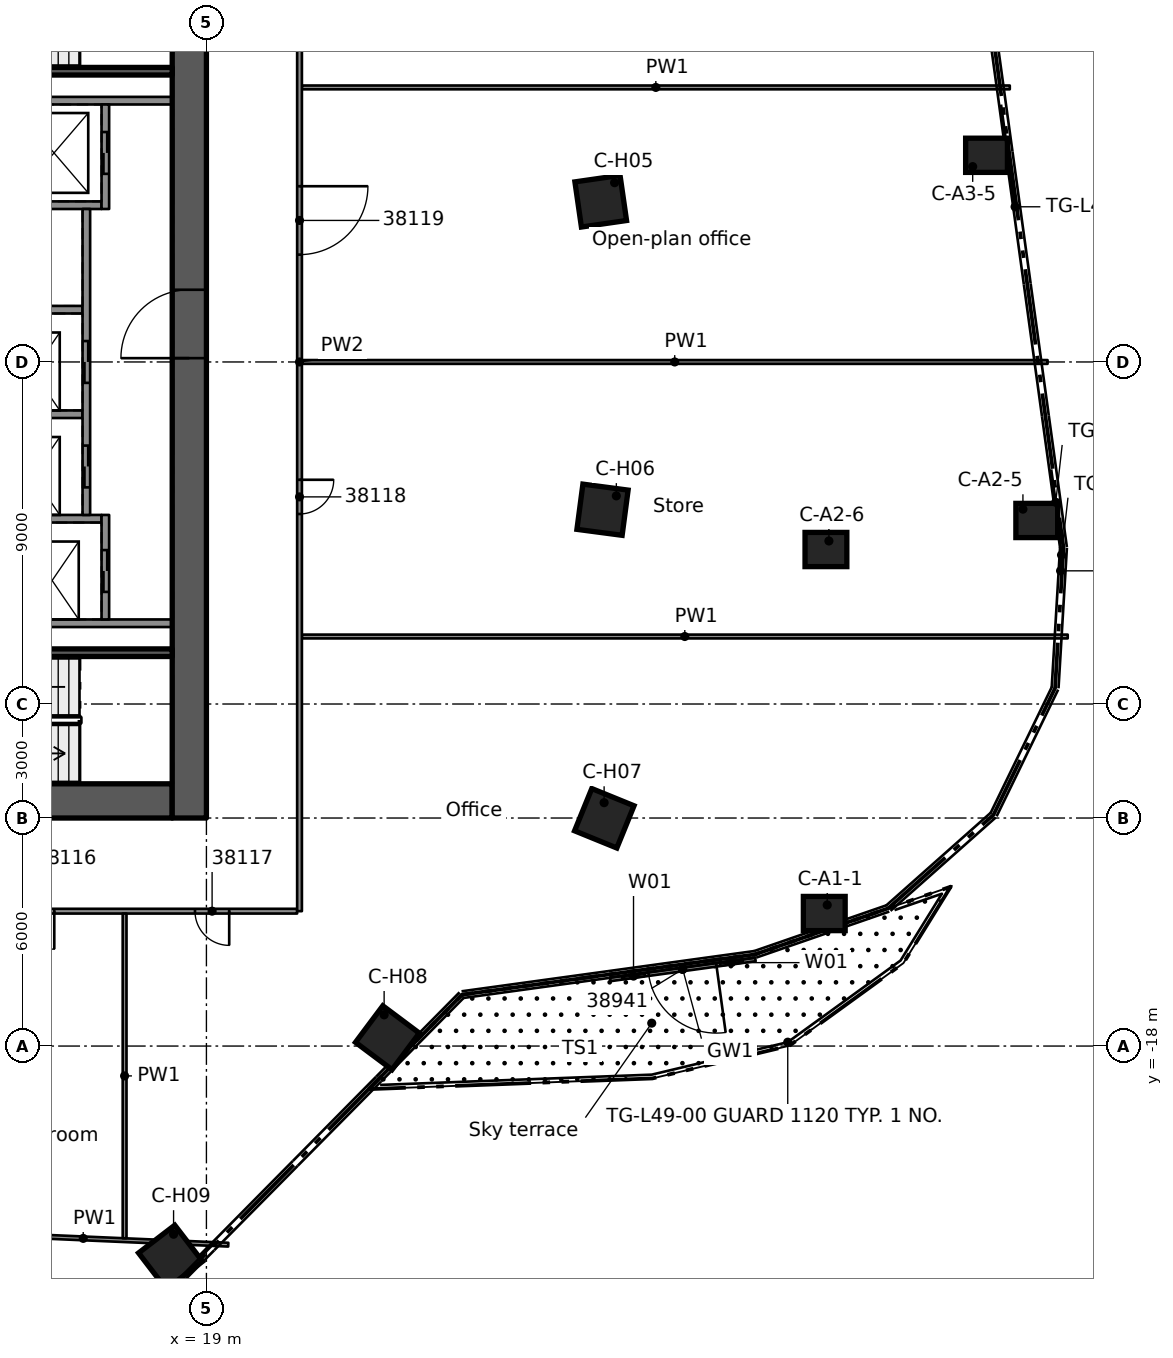
"""IFC4 building model, lengths in metres.
Left out: names, types, materials, properties, quantities, classifications, styles, units other than length and angle.
Written with IfcOpenShell. Run it as: python <this file> out.ifc"""

import sys

from ifc_helpers import new_model, si_unit, direction, frame, frame_2d, origin, origin_2d, place, context, subcontext, project, spatial, rectangle, extrude, element, fill, save


model = new_model("IFC4")
c1 = context("Model", 3, precision=1e-05, world=origin(), true_north=direction((0.0, 1.0)))
c2 = subcontext(c1, "Body", "Model", "MODEL_VIEW")
j1 = project(units=[si_unit("LENGTHUNIT", "METRE"), si_unit("PLANEANGLEUNIT", "RADIAN")], contexts=[c1])
p1 = place(None, origin())
s1 = spatial("IfcSite", under=j1, at=p1, CompositionType="ELEMENT")
p2 = place(p1, origin())
s2 = spatial("IfcBuilding", under=s1, at=p2, CompositionType="ELEMENT")
p3 = place(p2, frame((0.0, 0.0, 188.6)))
s3 = spatial("IfcBuildingStorey", under=s2, at=p3, CompositionType="ELEMENT", Elevation=188.6)
p4 = place(p3, frame((8.9, -11.55, 0.0), z_axis=(0.0, 0.0, 1.0), x_axis=(1.0, 0.0, 0.0)))
e1 = element("IfcWall", 1, at=p4, inside=s3, PredefinedType="SHEAR", context=c2, shape_type="SweptSolid", body=[
    extrude(rectangle(XDim=9.2, YDim=0.9, at=frame_2d((4.6, 0.0))), origin(), (0.0, 0.0, 1.0), 3.5),
])
p5 = place(p4, frame((3.0, 0.0, 0.0)))
e2 = element("IfcOpeningElement", 2, at=p5, cuts=e1, PredefinedType="OPENING", context=c2, shape_type="SweptSolid", body=[
    extrude(rectangle(XDim=1.1, YDim=2.1, at=frame_2d((0.55, 1.05))), frame((0.0, 0.46, 0.0), z_axis=(0.0, -1.0, 0.0), x_axis=(1.0, 0.0, 0.0)), (0.0, 0.0, 1.0), 0.92),
])
p6 = place(p3, frame((18.55, -12.0, 0.0), z_axis=(0.0, 0.0, 1.0), x_axis=(0.0, 1.0, 0.0)))
e3 = element("IfcWall", 3, at=p6, inside=s3, PredefinedType="SHEAR", context=c2, shape_type="SweptSolid", body=[
    extrude(rectangle(XDim=24.0, YDim=0.9, at=frame_2d((12.0, 0.0))), origin(), (0.0, 0.0, 1.0), 3.5),
])
p7 = place(p6, frame((12.1, 0.0, 0.0)))
e4 = element("IfcOpeningElement", 4, at=p7, cuts=e3, PredefinedType="OPENING", context=c2, shape_type="SweptSolid", body=[
    extrude(rectangle(XDim=1.8, YDim=2.1, at=frame_2d((0.9, 1.05))), frame((0.0, 0.46, 0.0), z_axis=(0.0, -1.0, 0.0), x_axis=(1.0, 0.0, 0.0)), (0.0, 0.0, 1.0), 0.92),
])
for number, where, z_axis, x_axis in (
    (5, (35.258, -14.513, 0.0), (0.0, 0.0, 1.0), (1.0, 0.0, 0.0)),
    (6, (40.85, -4.171, 0.0), (0.0, 0.0, 1.0), (1.0, 0.0, 0.0)),
    (7, (35.302, -4.935, 0.0), (0.0, 0.0, 1.0), (1.0, 0.0, 0.0)),
    (8, (39.528, 5.438, 0.0), (0.0, 0.0, 1.0), (1.0, 0.0, 0.0)),
):
    element("IfcColumn", number, at=place(p3, frame(where, z_axis=z_axis, x_axis=x_axis)), inside=s3, PredefinedType="COLUMN", context=c2, shape_type="SweptSolid", body=[
        extrude(rectangle(XDim=1.1, YDim=0.9, at=origin_2d()), origin(), (0.0, 0.0, 1.0), 3.5),
    ])
for number, where, z_axis, x_axis in (
    (9, (29.376, 4.23, 0.0), (0.0, 0.0, 1.0), (0.99, 0.143, 0.0)),
    (10, (29.423, -3.888, 0.0), (0.0, 0.0, 1.0), (0.991, -0.131, 0.0)),
    (11, (29.47, -12.007, 0.0), (0.0, 0.0, 1.0), (0.926, -0.377, 0.0)),
    (12, (23.763, -17.781, 0.0), (0.0, 0.0, 1.0), (0.801, -0.599, 0.0)),
    (13, (18.056, -23.555, 0.0), (0.0, 0.0, 1.0), (0.608, -0.794, 0.0)),
):
    element("IfcColumn", number, at=place(p3, frame(where, z_axis=z_axis, x_axis=x_axis)), inside=s3, PredefinedType="COLUMN", context=c2, shape_type="SweptSolid", body=[
        extrude(rectangle(XDim=1.2, YDim=1.2, at=origin_2d()), origin(), (0.0, 0.0, 1.0), 3.5),
    ])
for number, where, z_axis, x_axis in (
    (14, (11.54, -6.875, 0.0), (0.0, 0.0, 1.0), (1.0, 0.0, 0.0)),
    (15, (11.54, 6.875, 0.0), (0.0, 0.0, 1.0), (1.0, 0.0, 0.0)),
):
    element("IfcWall", number, at=place(p3, frame(where, z_axis=z_axis, x_axis=x_axis)), inside=s3, PredefinedType="SOLIDWALL", context=c2, shape_type="SweptSolid", body=[
        extrude(rectangle(XDim=6.56, YDim=0.2, at=frame_2d((3.28, 0.0))), origin(), (0.0, 0.0, 1.0), 3.08),
    ])
p8 = place(p3, frame((13.74, 4.125, 0.0), z_axis=(0.0, 0.0, 1.0), x_axis=(1.0, 0.0, 0.0)))
e16 = element("IfcWall", 16, at=p8, inside=s3, PredefinedType="SOLIDWALL", context=c2, shape_type="SweptSolid", body=[
    extrude(rectangle(XDim=2.5, YDim=0.2, at=frame_2d((1.25, 0.0))), origin(), (0.0, 0.0, 1.0), 3.08),
])
p9 = place(p3, frame((13.74, 1.375, 0.0), z_axis=(0.0, 0.0, 1.0), x_axis=(1.0, 0.0, 0.0)))
e17 = element("IfcWall", 17, at=p9, inside=s3, PredefinedType="SOLIDWALL", context=c2, shape_type="SweptSolid", body=[
    extrude(rectangle(XDim=2.0, YDim=0.2, at=frame_2d((1.0, 0.0))), origin(), (0.0, 0.0, 1.0), 3.08),
])
p10 = place(p3, frame((11.54, -1.375, 0.0), z_axis=(0.0, 0.0, 1.0), x_axis=(1.0, 0.0, 0.0)))
e18 = element("IfcWall", 18, at=p10, inside=s3, PredefinedType="SOLIDWALL", context=c2, shape_type="SweptSolid", body=[
    extrude(rectangle(XDim=4.2, YDim=0.2, at=frame_2d((2.1, 0.0))), origin(), (0.0, 0.0, 1.0), 3.08),
])
p11 = place(p3, frame((11.54, -4.125, 0.0), z_axis=(0.0, 0.0, 1.0), x_axis=(1.0, 0.0, 0.0)))
e19 = element("IfcWall", 19, at=p11, inside=s3, PredefinedType="SOLIDWALL", context=c2, shape_type="SweptSolid", body=[
    extrude(rectangle(XDim=4.7, YDim=0.2, at=frame_2d((2.35, 0.0))), origin(), (0.0, 0.0, 1.0), 3.08),
])
p12 = place(p3, frame((16.34, 6.775, 0.0), z_axis=(0.0, 0.0, 1.0), x_axis=(0.0, -1.0, 0.0)))
e20 = element("IfcWall", 20, at=p12, inside=s3, PredefinedType="SOLIDWALL", context=c2, shape_type="SweptSolid", body=[
    extrude(rectangle(XDim=2.75, YDim=0.2, at=frame_2d((1.375, 0.0))), origin(), (0.0, 0.0, 1.0), 3.08),
])
p13 = place(p12, frame((0.725, 0.0, 0.0)))
e21 = element("IfcOpeningElement", 21, at=p13, cuts=e20, PredefinedType="OPENING", context=c2, shape_type="SweptSolid", body=[
    extrude(rectangle(XDim=1.1, YDim=2.1, at=frame_2d((0.55, 1.05))), frame((0.0, 0.11, 0.0), z_axis=(0.0, -1.0, 0.0), x_axis=(1.0, 0.0, 0.0)), (0.0, 0.0, 1.0), 0.22),
])
p14 = place(p3, frame((15.84, 4.025, 0.0), z_axis=(0.0, 0.0, 1.0), x_axis=(0.0, -1.0, 0.0)))
e22 = element("IfcWall", 22, at=p14, inside=s3, PredefinedType="SOLIDWALL", context=c2, shape_type="SweptSolid", body=[
    extrude(rectangle(XDim=8.05, YDim=0.2, at=frame_2d((4.025, 0.0))), origin(), (0.0, 0.0, 1.0), 3.08),
])
p15 = place(p14, frame((3.475, 0.0, 0.0)))
e23 = element("IfcOpeningElement", 23, at=p15, cuts=e22, PredefinedType="OPENING", context=c2, shape_type="SweptSolid", body=[
    extrude(rectangle(XDim=1.1, YDim=2.1, at=frame_2d((0.55, 1.05))), frame((0.0, 0.11, 0.0), z_axis=(0.0, -1.0, 0.0), x_axis=(1.0, 0.0, 0.0)), (0.0, 0.0, 1.0), 0.22),
])
p16 = place(p14, frame((6.225, 0.0, 0.0)))
e24 = element("IfcOpeningElement", 24, at=p16, cuts=e22, PredefinedType="OPENING", context=c2, shape_type="SweptSolid", body=[
    extrude(rectangle(XDim=1.1, YDim=2.1, at=frame_2d((0.55, 1.05))), frame((0.0, 0.11, 0.0), z_axis=(0.0, -1.0, 0.0), x_axis=(1.0, 0.0, 0.0)), (0.0, 0.0, 1.0), 0.22),
])
p17 = place(p3, frame((16.34, -4.025, 0.0), z_axis=(0.0, 0.0, 1.0), x_axis=(0.0, -1.0, 0.0)))
e25 = element("IfcWall", 25, at=p17, inside=s3, PredefinedType="SOLIDWALL", context=c2, shape_type="SweptSolid", body=[
    extrude(rectangle(XDim=2.75, YDim=0.2, at=frame_2d((1.375, 0.0))), origin(), (0.0, 0.0, 1.0), 3.08),
])
p18 = place(p17, frame((0.925, 0.0, 0.0)))
e26 = element("IfcOpeningElement", 26, at=p18, cuts=e25, PredefinedType="OPENING", context=c2, shape_type="SweptSolid", body=[
    extrude(rectangle(XDim=1.1, YDim=2.1, at=frame_2d((0.55, 1.05))), frame((0.0, 0.11, 0.0), z_axis=(0.0, -1.0, 0.0), x_axis=(1.0, 0.0, 0.0)), (0.0, 0.0, 1.0), 0.22),
])
for number, where, z_axis, x_axis in (
    (27, (11.54, -7.65, 0.0), (0.0, 0.0, 1.0), (1.0, 0.0, 0.0)),
    (28, (11.54, 7.65, 0.0), (0.0, 0.0, 1.0), (1.0, 0.0, 0.0)),
):
    element("IfcWall", number, at=place(p3, frame(where, z_axis=z_axis, x_axis=x_axis)), inside=s3, PredefinedType="SOLIDWALL", context=c2, shape_type="SweptSolid", body=[
        extrude(rectangle(XDim=6.56, YDim=0.2, at=frame_2d((3.28, 0.0))), origin(), (0.0, 0.0, 1.0), 3.08),
    ])
p19 = place(p3, frame((33.446, -15.718, 0.0), z_axis=(0.0, 0.0, 1.0), x_axis=(-0.990667735634, -0.136299074001, 0.0)))
e29 = element("IfcWall", 29, at=p19, inside=s3, PredefinedType="STANDARD", context=c2, shape_type="SweptSolid", body=[
    extrude(rectangle(XDim=3.858, YDim=0.1, at=frame_2d((1.929, 0.0))), origin(), (0.0, 0.0, 1.0), 3.08),
])
p20 = place(p19, frame((1.037, 0.0, 0.0)))
e30 = element("IfcOpeningElement", 30, at=p20, cuts=e29, PredefinedType="OPENING", context=c2, shape_type="SweptSolid", body=[
    extrude(rectangle(XDim=1.8, YDim=2.4, at=frame_2d((0.9, 1.2))), frame((0.0, 0.06, 0.0), z_axis=(0.0, -1.0, 0.0), x_axis=(1.0, 0.0, 0.0)), (0.0, 0.0, 1.0), 0.12),
])
p21 = place(p19, frame((0.337, 0.0, 0.0)))
e31 = element("IfcOpeningElement", 31, at=p21, cuts=e29, PredefinedType="OPENING", context=c2, shape_type="SweptSolid", body=[
    extrude(rectangle(XDim=0.6, YDim=2.4, at=frame_2d((0.3, 1.2))), frame((0.0, 0.06, 0.0), z_axis=(0.0, -1.0, 0.0), x_axis=(1.0, 0.0, 0.0)), (0.0, 0.0, 1.0), 0.12),
])
p22 = place(p19, frame((2.937, 0.0, 0.0)))
e32 = element("IfcOpeningElement", 32, at=p22, cuts=e29, PredefinedType="OPENING", context=c2, shape_type="SweptSolid", body=[
    extrude(rectangle(XDim=0.6, YDim=2.4, at=frame_2d((0.3, 1.2))), frame((0.0, 0.06, 0.0), z_axis=(0.0, -1.0, 0.0), x_axis=(1.0, 0.0, 0.0)), (0.0, 0.0, 1.0), 0.12),
])
p23 = place(p3, frame((11.942, -22.895, 0.0), z_axis=(0.0, 0.0, 1.0), x_axis=(0.999060795111, -0.043330447407, 0.0)))
e33 = element("IfcWall", 33, at=p23, inside=s3, PredefinedType="PARTITIONING", context=c2, shape_type="SweptSolid", body=[
    extrude(rectangle(XDim=7.64, YDim=0.1, at=frame_2d((3.82, 0.0))), origin(), (0.0, 0.0, 1.0), 3.06),
])
p24 = place(p3, frame((21.387, -14.451, 0.0), z_axis=(0.0, 0.0, 1.0), x_axis=(-1.0, 0.0, 0.0)))
e34 = element("IfcWall", 34, at=p24, inside=s3, PredefinedType="PARTITIONING", context=c2, shape_type="SweptSolid", body=[
    extrude(rectangle(XDim=9.08, YDim=0.125, at=frame_2d((4.54, 0.0))), origin(), (0.0, 0.0, 1.0), 3.06),
])
p25 = place(p24, frame((6.39, 0.0, 0.0)))
e35 = element("IfcOpeningElement", 35, at=p25, cuts=e34, PredefinedType="OPENING", context=c2, shape_type="SweptSolid", body=[
    extrude(rectangle(XDim=1.0, YDim=2.1, at=frame_2d((0.5, 1.05))), frame((0.0, 0.073, 0.0), z_axis=(0.0, -1.0, 0.0), x_axis=(1.0, 0.0, 0.0)), (0.0, 0.0, 1.0), 0.145),
])
p26 = place(p24, frame((1.788, 0.0, 0.0)))
e36 = element("IfcOpeningElement", 36, at=p26, cuts=e34, PredefinedType="OPENING", context=c2, shape_type="SweptSolid", body=[
    extrude(rectangle(XDim=0.9, YDim=2.1, at=frame_2d((0.45, 1.05))), frame((0.0, 0.073, 0.0), z_axis=(0.0, -1.0, 0.0), x_axis=(1.0, 0.0, 0.0)), (0.0, 0.0, 1.0), 0.145),
])
p27 = place(p3, frame((21.512, -7.224, 0.0), z_axis=(0.0, 0.0, 1.0), x_axis=(1.0, 0.0, 0.0)))
e37 = element("IfcWall", 37, at=p27, inside=s3, PredefinedType="PARTITIONING", context=c2, shape_type="SweptSolid", body=[
    extrude(rectangle(XDim=20.152, YDim=0.1, at=frame_2d((10.076, 0.0))), origin(), (0.0, 0.0, 1.0), 3.06),
])
p28 = place(p3, frame((21.512, 0.0, 0.0), z_axis=(0.0, 0.0, 1.0), x_axis=(1.0, 0.0, 0.0)))
e38 = element("IfcWall", 38, at=p28, inside=s3, PredefinedType="PARTITIONING", context=c2, shape_type="SweptSolid", body=[
    extrude(rectangle(XDim=19.622, YDim=0.1, at=frame_2d((9.811, 0.0))), origin(), (0.0, 0.0, 1.0), 3.06),
])
p29 = place(p3, frame((21.512, 7.224, 0.0), z_axis=(0.0, 0.0, 1.0), x_axis=(1.0, 0.0, 0.0)))
e39 = element("IfcWall", 39, at=p29, inside=s3, PredefinedType="PARTITIONING", context=c2, shape_type="SweptSolid", body=[
    extrude(rectangle(XDim=18.628, YDim=0.1, at=frame_2d((9.314, 0.0))), origin(), (0.0, 0.0, 1.0), 3.06),
])
p30 = place(p3, frame((21.45, 14.451, 0.0), z_axis=(0.0, 0.0, 1.0), x_axis=(0.0, -1.0, 0.0)))
e40 = element("IfcWall", 40, at=p30, inside=s3, PredefinedType="PARTITIONING", context=c2, shape_type="SweptSolid", body=[
    extrude(rectangle(XDim=28.902, YDim=0.125, at=frame_2d((14.451, 0.0))), origin(), (0.0, 0.0, 1.0), 3.06),
])
p31 = place(p30, frame((17.551, 0.0, 0.0)))
e41 = element("IfcOpeningElement", 41, at=p31, cuts=e40, PredefinedType="OPENING", context=c2, shape_type="SweptSolid", body=[
    extrude(rectangle(XDim=0.9, YDim=2.1, at=frame_2d((0.45, 1.05))), frame((0.0, 0.073, 0.0), z_axis=(0.0, -1.0, 0.0), x_axis=(1.0, 0.0, 0.0)), (0.0, 0.0, 1.0), 0.145),
])
p32 = place(p30, frame((9.827, 0.0, 0.0)))
e42 = element("IfcOpeningElement", 42, at=p32, cuts=e40, PredefinedType="OPENING", context=c2, shape_type="SweptSolid", body=[
    extrude(rectangle(XDim=1.8, YDim=2.1, at=frame_2d((0.9, 1.05))), frame((0.0, 0.073, 0.0), z_axis=(0.0, -1.0, 0.0), x_axis=(1.0, 0.0, 0.0)), (0.0, 0.0, 1.0), 0.145),
])
p33 = place(p3, frame((16.847, -23.057, 0.0), z_axis=(0.0, 0.0, 1.0), x_axis=(0.0, 1.0, 0.0)))
e43 = element("IfcWall", 43, at=p33, inside=s3, PredefinedType="PARTITIONING", context=c2, shape_type="SweptSolid", body=[
    extrude(rectangle(XDim=8.543, YDim=0.1, at=frame_2d((4.271, 0.0))), origin(), (0.0, 0.0, 1.0), 3.06),
])
p34 = place(p13, origin())
e44 = element("IfcDoor", 44, at=p34, inside=s3, OperationType="DOUBLE_DOOR_SLIDING", PredefinedType="DOOR", context=c2, shape_type="SweptSolid", body=[
    extrude(rectangle(XDim=1.1, YDim=2.1, at=frame_2d((0.55, 1.05))), frame((0.0, 0.025, 0.0), z_axis=(0.0, -1.0, 0.0), x_axis=(1.0, 0.0, 0.0)), (0.0, 0.0, 1.0), 0.05),
])
fill(e21, e44)
p35 = place(p15, origin())
e45 = element("IfcDoor", 45, at=p35, inside=s3, OperationType="DOUBLE_DOOR_SLIDING", PredefinedType="DOOR", context=c2, shape_type="SweptSolid", body=[
    extrude(rectangle(XDim=1.1, YDim=2.1, at=frame_2d((0.55, 1.05))), frame((0.0, 0.025, 0.0), z_axis=(0.0, -1.0, 0.0), x_axis=(1.0, 0.0, 0.0)), (0.0, 0.0, 1.0), 0.05),
])
fill(e23, e45)
p36 = place(p16, origin())
e46 = element("IfcDoor", 46, at=p36, inside=s3, OperationType="DOUBLE_DOOR_SLIDING", PredefinedType="DOOR", context=c2, shape_type="SweptSolid", body=[
    extrude(rectangle(XDim=1.1, YDim=2.1, at=frame_2d((0.55, 1.05))), frame((0.0, 0.025, 0.0), z_axis=(0.0, -1.0, 0.0), x_axis=(1.0, 0.0, 0.0)), (0.0, 0.0, 1.0), 0.05),
])
fill(e24, e46)
p37 = place(p18, origin())
e47 = element("IfcDoor", 47, at=p37, inside=s3, OperationType="DOUBLE_DOOR_SLIDING", PredefinedType="DOOR", context=c2, shape_type="SweptSolid", body=[
    extrude(rectangle(XDim=1.1, YDim=2.1, at=frame_2d((0.55, 1.05))), frame((0.0, 0.025, 0.0), z_axis=(0.0, -1.0, 0.0), x_axis=(1.0, 0.0, 0.0)), (0.0, 0.0, 1.0), 0.05),
])
fill(e26, e47)
p38 = place(p7, origin())
e48 = element("IfcDoor", 48, at=p38, inside=s3, OperationType="SINGLE_SWING_RIGHT", PredefinedType="DOOR", context=c2, shape_type="SweptSolid", body=[
    extrude(rectangle(XDim=1.8, YDim=2.1, at=frame_2d((0.9, 1.05))), frame((0.0, 0.025, 0.0), z_axis=(0.0, -1.0, 0.0), x_axis=(1.0, 0.0, 0.0)), (0.0, 0.0, 1.0), 0.05),
])
fill(e4, e48)
p39 = place(p20, origin())
e49 = element("IfcDoor", 49, at=p39, inside=s3, OperationType="DOUBLE_DOOR_SINGLE_SWING", PredefinedType="DOOR", context=c2, shape_type="SweptSolid", body=[
    extrude(rectangle(XDim=1.8, YDim=2.4, at=frame_2d((0.9, 1.2))), frame((0.0, 0.025, 0.0), z_axis=(0.0, -1.0, 0.0), x_axis=(1.0, 0.0, 0.0)), (0.0, 0.0, 1.0), 0.05),
])
fill(e30, e49)
p40 = place(p21, origin())
e50 = element("IfcWindow", 50, at=p40, inside=s3, PartitioningType="SINGLE_PANEL", PredefinedType="WINDOW", context=c2, shape_type="SweptSolid", body=[
    extrude(rectangle(XDim=0.6, YDim=2.4, at=frame_2d((0.3, 1.2))), frame((0.0, 0.03, 0.0), z_axis=(0.0, -1.0, 0.0), x_axis=(1.0, 0.0, 0.0)), (0.0, 0.0, 1.0), 0.06),
])
fill(e31, e50)
p41 = place(p22, origin())
e51 = element("IfcWindow", 51, at=p41, inside=s3, PartitioningType="SINGLE_PANEL", PredefinedType="WINDOW", context=c2, shape_type="SweptSolid", body=[
    extrude(rectangle(XDim=0.6, YDim=2.4, at=frame_2d((0.3, 1.2))), frame((0.0, 0.03, 0.0), z_axis=(0.0, -1.0, 0.0), x_axis=(1.0, 0.0, 0.0)), (0.0, 0.0, 1.0), 0.06),
])
fill(e32, e51)
p42 = place(p25, origin())
e52 = element("IfcDoor", 52, at=p42, inside=s3, OperationType="SINGLE_SWING_RIGHT", PredefinedType="DOOR", context=c2, shape_type="SweptSolid", body=[
    extrude(rectangle(XDim=1.0, YDim=2.1, at=frame_2d((0.5, 1.05))), frame((0.0, 0.025, 0.0), z_axis=(0.0, -1.0, 0.0), x_axis=(1.0, 0.0, 0.0)), (0.0, 0.0, 1.0), 0.05),
])
fill(e35, e52)
p43 = place(p26, origin())
e53 = element("IfcDoor", 53, at=p43, inside=s3, OperationType="SINGLE_SWING_LEFT", PredefinedType="DOOR", context=c2, shape_type="SweptSolid", body=[
    extrude(rectangle(XDim=0.9, YDim=2.1, at=frame_2d((0.45, 1.05))), frame((0.0, 0.025, 0.0), z_axis=(0.0, -1.0, 0.0), x_axis=(1.0, 0.0, 0.0)), (0.0, 0.0, 1.0), 0.05),
])
fill(e36, e53)
p44 = place(p31, origin())
e54 = element("IfcDoor", 54, at=p44, inside=s3, OperationType="SINGLE_SWING_RIGHT", PredefinedType="DOOR", context=c2, shape_type="SweptSolid", body=[
    extrude(rectangle(XDim=0.9, YDim=2.1, at=frame_2d((0.45, 1.05))), frame((0.0, 0.025, 0.0), z_axis=(0.0, -1.0, 0.0), x_axis=(1.0, 0.0, 0.0)), (0.0, 0.0, 1.0), 0.05),
])
fill(e41, e54)
p45 = place(p32, origin())
e55 = element("IfcDoor", 55, at=p45, inside=s3, OperationType="DOUBLE_DOOR_SINGLE_SWING", PredefinedType="DOOR", context=c2, shape_type="SweptSolid", body=[
    extrude(rectangle(XDim=1.8, YDim=2.1, at=frame_2d((0.9, 1.05))), frame((0.0, 0.025, 0.0), z_axis=(0.0, -1.0, 0.0), x_axis=(1.0, 0.0, 0.0)), (0.0, 0.0, 1.0), 0.05),
])
fill(e42, e55)
save(model, sys.argv[1])
